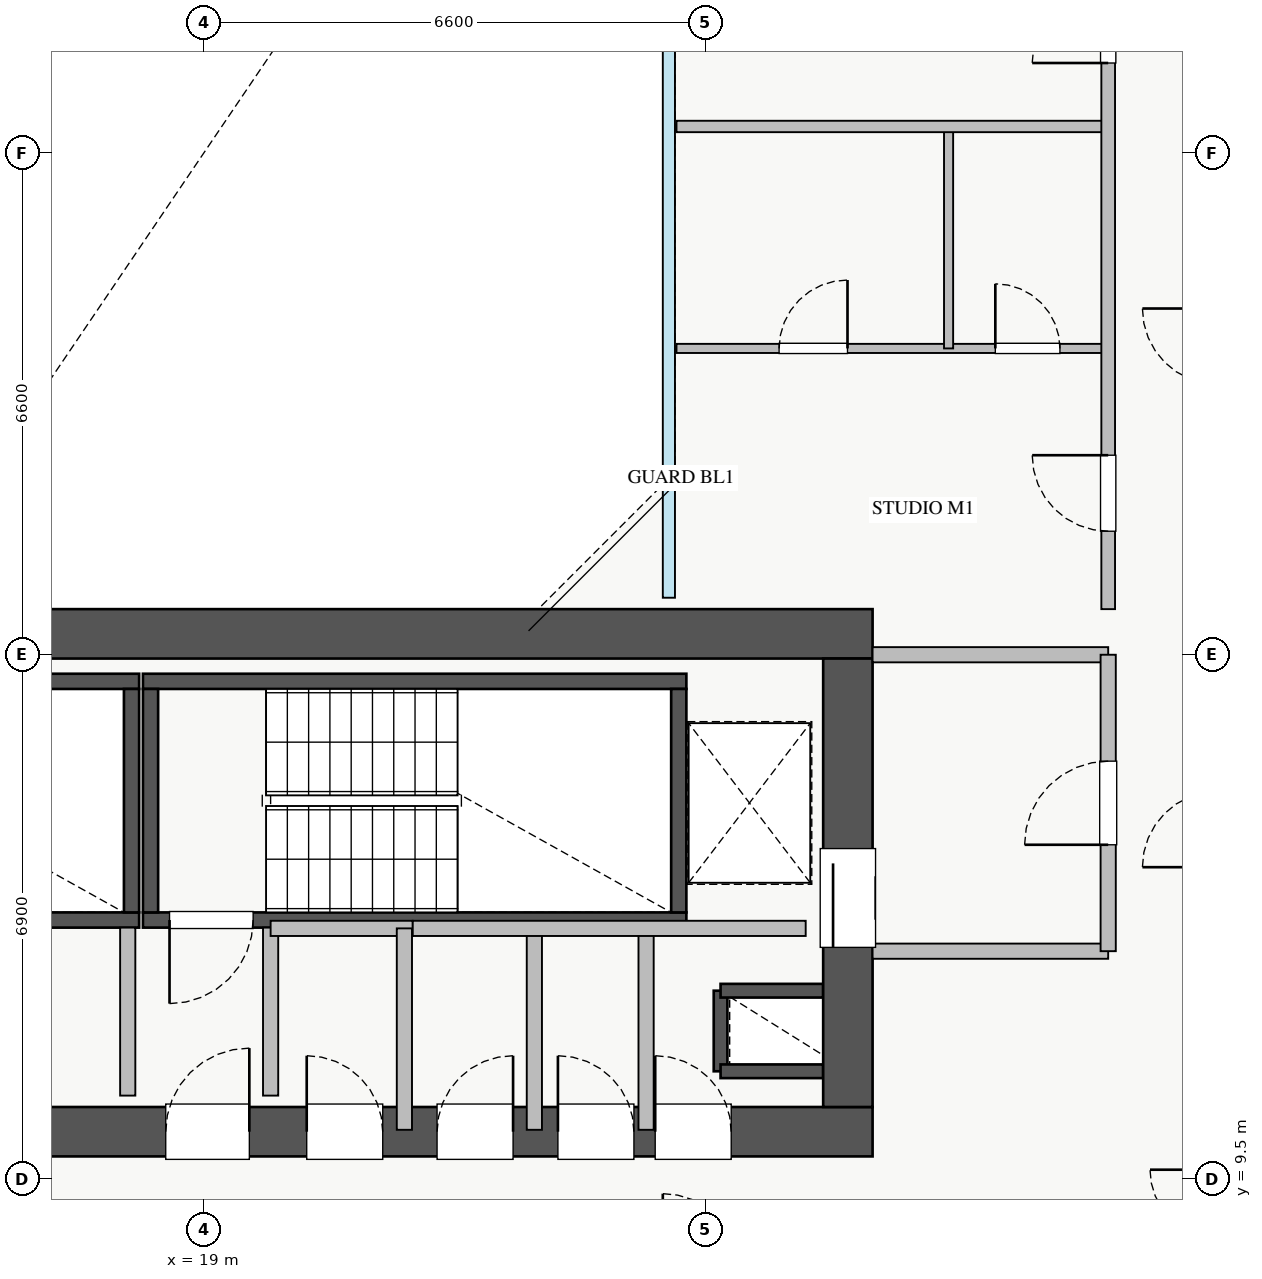
"""IFC4 building model, lengths in metres.
Left out: names, types, materials, properties, quantities, classifications, styles, units other than length and angle.
Written with IfcOpenShell. Run it as: python <this file> out.ifc"""

import sys

from ifc_helpers import new_model, si_unit, direction, frame, frame_2d, origin, place, context, subcontext, project, spatial, rectangle, extrude, source, transform, mapped, element, fill, save


model = new_model("IFC4")
c1 = context("Model", 3, precision=1e-05, world=origin(), true_north=direction((0.0, 1.0)))
c2 = subcontext(c1, "Body", "Model", "MODEL_VIEW")
j1 = project(units=[si_unit("LENGTHUNIT", "METRE"), si_unit("PLANEANGLEUNIT", "RADIAN")], contexts=[c1])
p1 = place(None, origin())
s1 = spatial("IfcSite", under=j1, at=p1, CompositionType="ELEMENT")
p2 = place(p1, origin())
s2 = spatial("IfcBuilding", under=s1, at=p2, CompositionType="ELEMENT")
p3 = place(p2, frame((0.0, 0.0, 123.0)))
s3 = spatial("IfcBuildingStorey", under=s2, at=p3, CompositionType="ELEMENT", Elevation=123.0)
p4 = place(p3, frame((25.8, 10.92, 0.0), z_axis=(0.0, 0.0, 1.0), x_axis=(0.0, 1.0, 0.0)))
e1 = element("IfcWall", 1, at=p4, inside=s3, PredefinedType="SHEAR", context=c2, shape_type="SweptSolid", body=[
    extrude(rectangle(XDim=1.06, YDim=0.18, at=frame_2d((0.53, 0.0))), origin(), (0.0, 0.0, 1.0), 3.07),
])
for number, where, z_axis, x_axis in (
    (2, (25.8, 11.98, 0.0), (0.0, 0.0, 1.0), (1.0, 0.0, 0.0)),
    (3, (25.8, 10.92, 0.0), (0.0, 0.0, 1.0), (1.0, 0.0, 0.0)),
):
    element("IfcWall", number, at=place(p3, frame(where, z_axis=z_axis, x_axis=x_axis)), inside=s3, PredefinedType="SHEAR", context=c2, shape_type="SweptSolid", body=[
        extrude(rectangle(XDim=1.35, YDim=0.18, at=frame_2d((0.675, 0.0))), origin(), (0.0, 0.0, 1.0), 3.07),
    ])
p5 = place(p3, frame((10.85, 12.91, 0.0), z_axis=(0.0, 0.0, 1.0), x_axis=(1.0, 0.0, 0.0)))
e4 = element("IfcWall", 4, at=p5, inside=s3, PredefinedType="SHEAR", context=c2, shape_type="SweptSolid", body=[
    extrude(rectangle(XDim=7.3, YDim=0.2, at=frame_2d((3.65, 0.0))), origin(), (0.0, 0.0, 1.0), 3.25),
])
p6 = place(p5, frame((0.35, 0.0, 0.0)))
e5 = element("IfcOpeningElement", 5, at=p6, cuts=e4, PredefinedType="OPENING", context=c2, shape_type="SweptSolid", body=[
    extrude(rectangle(XDim=1.1, YDim=2.05, at=frame_2d((0.55, 1.025))), frame((0.0, 0.11, 0.0), z_axis=(0.0, -1.0, 0.0), x_axis=(1.0, 0.0, 0.0)), (0.0, 0.0, 1.0), 0.22),
])
p7 = place(p3, frame((10.85, 16.05, 0.0), z_axis=(0.0, 0.0, 1.0), x_axis=(1.0, 0.0, 0.0)))
e6 = element("IfcWall", 6, at=p7, inside=s3, PredefinedType="SHEAR", context=c2, shape_type="SweptSolid", body=[
    extrude(rectangle(XDim=7.3, YDim=0.2, at=frame_2d((3.65, 0.0))), origin(), (0.0, 0.0, 1.0), 3.25),
])
p8 = place(p3, frame((18.05, 13.01, 0.0), z_axis=(0.0, 0.0, 1.0), x_axis=(0.0, 1.0, 0.0)))
e7 = element("IfcWall", 7, at=p8, inside=s3, PredefinedType="SHEAR", context=c2, shape_type="SweptSolid", body=[
    extrude(rectangle(XDim=2.94, YDim=0.2, at=frame_2d((1.47, 0.0))), origin(), (0.0, 0.0, 1.0), 3.25),
])
p9 = place(p3, frame((18.2, 12.91, 0.0), z_axis=(0.0, 0.0, 1.0), x_axis=(1.0, 0.0, 0.0)))
e8 = element("IfcWall", 8, at=p9, inside=s3, PredefinedType="SHEAR", context=c2, shape_type="SweptSolid", body=[
    extrude(rectangle(XDim=7.15, YDim=0.2, at=frame_2d((3.575, 0.0))), origin(), (0.0, 0.0, 1.0), 3.25),
])
p10 = place(p9, frame((0.35, 0.0, 0.0)))
e9 = element("IfcOpeningElement", 9, at=p10, cuts=e8, PredefinedType="OPENING", context=c2, shape_type="SweptSolid", body=[
    extrude(rectangle(XDim=1.1, YDim=2.05, at=frame_2d((0.55, 1.025))), frame((0.0, 0.11, 0.0), z_axis=(0.0, -1.0, 0.0), x_axis=(1.0, 0.0, 0.0)), (0.0, 0.0, 1.0), 0.22),
])
p11 = place(p3, frame((18.2, 16.05, 0.0), z_axis=(0.0, 0.0, 1.0), x_axis=(1.0, 0.0, 0.0)))
e10 = element("IfcWall", 10, at=p11, inside=s3, PredefinedType="SHEAR", context=c2, shape_type="SweptSolid", body=[
    extrude(rectangle(XDim=7.15, YDim=0.2, at=frame_2d((3.575, 0.0))), origin(), (0.0, 0.0, 1.0), 3.25),
])
for number, where, z_axis, x_axis in (
    (11, (18.3, 13.01, 0.0), (0.0, 0.0, 1.0), (0.0, 1.0, 0.0)),
    (12, (25.25, 13.01, 0.0), (0.0, 0.0, 1.0), (0.0, 1.0, 0.0)),
):
    element("IfcWall", number, at=place(p3, frame(where, z_axis=z_axis, x_axis=x_axis)), inside=s3, PredefinedType="SHEAR", context=c2, shape_type="SweptSolid", body=[
        extrude(rectangle(XDim=2.94, YDim=0.2, at=frame_2d((1.47, 0.0))), origin(), (0.0, 0.0, 1.0), 3.25),
    ])
p12 = place(p3, frame((10.2, 10.125, 0.0), z_axis=(0.0, 0.0, 1.0), x_axis=(1.0, 0.0, 0.0)))
e13 = element("IfcWall", 13, at=p12, inside=s3, PredefinedType="SHEAR", context=c2, shape_type="SweptSolid", body=[
    extrude(rectangle(XDim=17.6, YDim=0.65, at=frame_2d((8.8, 0.0))), origin(), (0.0, 0.0, 1.0), 3.25),
])
p13 = place(p12, frame((1.15, 0.0, 0.0)))
e14 = element("IfcOpeningElement", 14, at=p13, cuts=e13, PredefinedType="OPENING", context=c2, shape_type="SweptSolid", body=[
    extrude(rectangle(XDim=1.1, YDim=2.05, at=frame_2d((0.55, 1.025))), frame((0.0, 0.335, 0.0), z_axis=(0.0, -1.0, 0.0), x_axis=(1.0, 0.0, 0.0)), (0.0, 0.0, 1.0), 0.67),
])
p14 = place(p12, frame((8.3, 0.0, 0.0)))
e15 = element("IfcOpeningElement", 15, at=p14, cuts=e13, PredefinedType="OPENING", context=c2, shape_type="SweptSolid", body=[
    extrude(rectangle(XDim=1.1, YDim=2.05, at=frame_2d((0.55, 1.025))), frame((0.0, 0.335, 0.0), z_axis=(0.0, -1.0, 0.0), x_axis=(1.0, 0.0, 0.0)), (0.0, 0.0, 1.0), 0.67),
])
p15 = place(p12, frame((4.9, 0.0, 0.0)))
e16 = element("IfcOpeningElement", 16, at=p15, cuts=e13, PredefinedType="OPENING", context=c2, shape_type="SweptSolid", body=[
    extrude(rectangle(XDim=1.1, YDim=2.05, at=frame_2d((0.55, 1.025))), frame((0.0, 0.335, 0.0), z_axis=(0.0, -1.0, 0.0), x_axis=(1.0, 0.0, 0.0)), (0.0, 0.0, 1.0), 0.67),
])
p16 = place(p12, frame((14.74, 0.0, 0.0)))
e17 = element("IfcOpeningElement", 17, at=p16, cuts=e13, PredefinedType="OPENING", context=c2, shape_type="SweptSolid", body=[
    extrude(rectangle(XDim=1.0, YDim=2.05, at=frame_2d((0.5, 1.025))), frame((0.0, 0.335, 0.0), z_axis=(0.0, -1.0, 0.0), x_axis=(1.0, 0.0, 0.0)), (0.0, 0.0, 1.0), 0.67),
])
p17 = place(p12, frame((10.155, 0.0, 0.0)))
e18 = element("IfcOpeningElement", 18, at=p17, cuts=e13, PredefinedType="OPENING", context=c2, shape_type="SweptSolid", body=[
    extrude(rectangle(XDim=1.0, YDim=2.05, at=frame_2d((0.5, 1.025))), frame((0.0, 0.335, 0.0), z_axis=(0.0, -1.0, 0.0), x_axis=(1.0, 0.0, 0.0)), (0.0, 0.0, 1.0), 0.67),
])
p18 = place(p12, frame((11.87, 0.0, 0.0)))
e19 = element("IfcOpeningElement", 19, at=p18, cuts=e13, PredefinedType="OPENING", context=c2, shape_type="SweptSolid", body=[
    extrude(rectangle(XDim=1.0, YDim=2.05, at=frame_2d((0.5, 1.025))), frame((0.0, 0.335, 0.0), z_axis=(0.0, -1.0, 0.0), x_axis=(1.0, 0.0, 0.0)), (0.0, 0.0, 1.0), 0.67),
])
p19 = place(p12, frame((13.46, 0.0, 0.0)))
e20 = element("IfcOpeningElement", 20, at=p19, cuts=e13, PredefinedType="OPENING", context=c2, shape_type="SweptSolid", body=[
    extrude(rectangle(XDim=1.0, YDim=2.05, at=frame_2d((0.5, 1.025))), frame((0.0, 0.335, 0.0), z_axis=(0.0, -1.0, 0.0), x_axis=(1.0, 0.0, 0.0)), (0.0, 0.0, 1.0), 0.67),
])
p20 = place(p3, frame((10.2, 16.675, 0.0), z_axis=(0.0, 0.0, 1.0), x_axis=(1.0, 0.0, 0.0)))
e21 = element("IfcWall", 21, at=p20, inside=s3, PredefinedType="SHEAR", context=c2, shape_type="SweptSolid", body=[
    extrude(rectangle(XDim=17.6, YDim=0.65, at=frame_2d((8.8, 0.0))), origin(), (0.0, 0.0, 1.0), 3.25),
])
p21 = place(p3, frame((27.475, 10.45, 0.0), z_axis=(0.0, 0.0, 1.0), x_axis=(0.0, 1.0, 0.0)))
e22 = element("IfcWall", 22, at=p21, inside=s3, PredefinedType="SHEAR", context=c2, shape_type="SweptSolid", body=[
    extrude(rectangle(XDim=5.9, YDim=0.65, at=frame_2d((2.95, 0.0))), origin(), (0.0, 0.0, 1.0), 3.25),
])
p22 = place(p21, frame((2.1, 0.0, 0.0)))
e23 = element("IfcOpeningElement", 23, at=p22, cuts=e22, PredefinedType="OPENING", context=c2, shape_type="SweptSolid", body=[
    extrude(rectangle(XDim=1.3, YDim=2.05, at=frame_2d((0.65, 1.025))), frame((0.0, 0.335, 0.0), z_axis=(0.0, -1.0, 0.0), x_axis=(1.0, 0.0, 0.0)), (0.0, 0.0, 1.0), 0.67),
])
for number, where, z_axis, x_axis in (
    (24, (27.8, 16.4, 0.0), (0.0, 0.0, 1.0), (1.0, 0.0, 0.0)),
    (25, (27.8, 12.5, 0.0), (0.0, 0.0, 1.0), (1.0, 0.0, 0.0)),
):
    element("IfcWall", number, at=place(p3, frame(where, z_axis=z_axis, x_axis=x_axis)), inside=s3, PredefinedType="PARTITIONING", context=c2, shape_type="SweptSolid", body=[
        extrude(rectangle(XDim=3.1, YDim=0.2, at=frame_2d((1.55, 0.0))), origin(), (0.0, 0.0, 1.0), 3.07),
    ])
p23 = place(p3, frame((30.9, 12.5, 0.0), z_axis=(0.0, 0.0, 1.0), x_axis=(0.0, 1.0, 0.0)))
e26 = element("IfcWall", 26, at=p23, inside=s3, PredefinedType="PARTITIONING", context=c2, shape_type="SweptSolid", body=[
    extrude(rectangle(XDim=3.9, YDim=0.2, at=frame_2d((1.95, 0.0))), origin(), (0.0, 0.0, 1.0), 3.07),
])
p24 = place(p23, frame((1.4, 0.0, 0.0)))
e27 = element("IfcOpeningElement", 27, at=p24, cuts=e26, PredefinedType="OPENING", context=c2, shape_type="SweptSolid", body=[
    extrude(rectangle(XDim=1.1, YDim=2.05, at=frame_2d((0.55, 1.025))), frame((0.0, 0.11, 0.0), z_axis=(0.0, -1.0, 0.0), x_axis=(1.0, 0.0, 0.0)), (0.0, 0.0, 1.0), 0.22),
])
for number, where, z_axis, x_axis in (
    (28, (18.0, 10.6, 0.0), (0.0, 0.0, 1.0), (0.0, 1.0, 0.0)),
    (29, (19.88, 10.6, 0.0), (0.0, 0.0, 1.0), (0.0, 1.0, 0.0)),
):
    element("IfcWall", number, at=place(p3, frame(where, z_axis=z_axis, x_axis=x_axis)), inside=s3, PredefinedType="PARTITIONING", context=c2, shape_type="SweptSolid", body=[
        extrude(rectangle(XDim=2.21, YDim=0.2, at=frame_2d((1.105, 0.0))), origin(), (0.0, 0.0, 1.0), 3.07),
    ])
p25 = place(p3, frame((24.82, 10.15, 0.0), z_axis=(0.0, 0.0, 1.0), x_axis=(0.0, 1.0, 0.0)))
e30 = element("IfcWall", 30, at=p25, inside=s3, PredefinedType="PARTITIONING", context=c2, shape_type="SweptSolid", body=[
    extrude(rectangle(XDim=2.65, YDim=0.2, at=frame_2d((1.325, 0.0))), origin(), (0.0, 0.0, 1.0), 3.07),
])
p26 = place(p3, frame((19.88, 12.8, 0.0), z_axis=(0.0, 0.0, 1.0), x_axis=(1.0, 0.0, 0.0)))
e31 = element("IfcWall", 31, at=p26, inside=s3, PredefinedType="PARTITIONING", context=c2, shape_type="SweptSolid", body=[
    extrude(rectangle(XDim=1.87, YDim=0.2, at=frame_2d((0.935, 0.0))), origin(), (0.0, 0.0, 1.0), 3.07),
])
for number, where, z_axis, x_axis in (
    (32, (21.64, 10.15, 0.0), (0.0, 0.0, 1.0), (0.0, 1.0, 0.0)),
    (33, (23.35, 10.15, 0.0), (0.0, 0.0, 1.0), (0.0, 1.0, 0.0)),
):
    element("IfcWall", number, at=place(p3, frame(where, z_axis=z_axis, x_axis=x_axis)), inside=s3, PredefinedType="PARTITIONING", context=c2, shape_type="SweptSolid", body=[
        extrude(rectangle(XDim=2.65, YDim=0.2, at=frame_2d((1.325, 0.0))), origin(), (0.0, 0.0, 1.0), 3.07),
    ])
p27 = place(p3, frame((21.75, 12.8, 0.0), z_axis=(0.0, 0.0, 1.0), x_axis=(1.0, 0.0, 0.0)))
e34 = element("IfcWall", 34, at=p27, inside=s3, PredefinedType="PARTITIONING", context=c2, shape_type="SweptSolid", body=[
    extrude(rectangle(XDim=5.17, YDim=0.2, at=frame_2d((2.585, 0.0))), origin(), (0.0, 0.0, 1.0), 3.07),
])
p28 = place(p3, frame((25.22, 20.43, 0.0), z_axis=(0.0, 0.0, 1.0), x_axis=(1.0, 0.0, 0.0)))
e35 = element("IfcWall", 35, at=p28, inside=s3, PredefinedType="PLUMBINGWALL", context=c2, shape_type="SweptSolid", body=[
    extrude(rectangle(XDim=5.68, YDim=0.12, at=frame_2d((2.84, 0.0))), origin(), (0.0, 0.0, 1.0), 3.07),
])
p29 = place(p28, frame((1.35, 0.0, 0.0)))
e36 = element("IfcOpeningElement", 36, at=p29, cuts=e35, PredefinedType="OPENING", context=c2, shape_type="SweptSolid", body=[
    extrude(rectangle(XDim=0.9, YDim=2.05, at=frame_2d((0.45, 1.025))), frame((0.0, 0.07, 0.0), z_axis=(0.0, -1.0, 0.0), x_axis=(1.0, 0.0, 0.0)), (0.0, 0.0, 1.0), 0.14),
])
p30 = place(p28, frame((4.195, 0.0, 0.0)))
e37 = element("IfcOpeningElement", 37, at=p30, cuts=e35, PredefinedType="OPENING", context=c2, shape_type="SweptSolid", body=[
    extrude(rectangle(XDim=0.85, YDim=2.05, at=frame_2d((0.425, 1.025))), frame((0.0, 0.07, 0.0), z_axis=(0.0, -1.0, 0.0), x_axis=(1.0, 0.0, 0.0)), (0.0, 0.0, 1.0), 0.14),
])
p31 = place(p3, frame((28.8, 20.43, 0.0), z_axis=(0.0, 0.0, 1.0), x_axis=(0.0, 1.0, 0.0)))
e38 = element("IfcWall", 38, at=p31, inside=s3, PredefinedType="PLUMBINGWALL", context=c2, shape_type="SweptSolid", body=[
    extrude(rectangle(XDim=2.92, YDim=0.12, at=frame_2d((1.46, 0.0))), origin(), (0.0, 0.0, 1.0), 3.07),
])
p32 = place(p3, frame((25.22, 23.35, 0.0), z_axis=(0.0, 0.0, 1.0), x_axis=(1.0, 0.0, 0.0)))
e39 = element("IfcWall", 39, at=p32, inside=s3, PredefinedType="PARTITIONING", context=c2, shape_type="SweptSolid", body=[
    extrude(rectangle(XDim=5.68, YDim=0.15, at=frame_2d((2.84, 0.0))), origin(), (0.0, 0.0, 1.0), 3.07),
])
p33 = place(p3, frame((30.9, 17.0, 0.0), z_axis=(0.0, 0.0, 1.0), x_axis=(0.0, 1.0, 0.0)))
e40 = element("IfcWall", 40, at=p33, inside=s3, PredefinedType="PARTITIONING", context=c2, shape_type="SweptSolid", body=[
    extrude(rectangle(XDim=12.0, YDim=0.18, at=frame_2d((6.0, 0.0))), origin(), (0.0, 0.0, 1.0), 3.07),
])
p34 = place(p33, frame((1.025, 0.0, 0.0)))
e41 = element("IfcOpeningElement", 41, at=p34, cuts=e40, PredefinedType="OPENING", context=c2, shape_type="SweptSolid", body=[
    extrude(rectangle(XDim=1.0, YDim=2.05, at=frame_2d((0.5, 1.025))), frame((0.0, 0.1, 0.0), z_axis=(0.0, -1.0, 0.0), x_axis=(1.0, 0.0, 0.0)), (0.0, 0.0, 1.0), 0.2),
])
p35 = place(p33, frame((7.185, 0.0, 0.0)))
e42 = element("IfcOpeningElement", 42, at=p35, cuts=e40, PredefinedType="OPENING", context=c2, shape_type="SweptSolid", body=[
    extrude(rectangle(XDim=1.0, YDim=2.05, at=frame_2d((0.5, 1.025))), frame((0.0, 0.1, 0.0), z_axis=(0.0, -1.0, 0.0), x_axis=(1.0, 0.0, 0.0)), (0.0, 0.0, 1.0), 0.2),
])
m1 = source(origin(), c2, "Body", "SweptSolid", [
    extrude(rectangle(XDim=1.3, YDim=2.05, at=frame_2d((0.65, 1.025))), frame((0.0, 0.025, 0.0), z_axis=(0.0, -1.0, 0.0), x_axis=(1.0, 0.0, 0.0)), (0.0, 0.0, 1.0), 0.05),
])
p36 = place(p22, origin())
e43 = element("IfcDoor", 43, at=p36, inside=s3, OperationType="SLIDING_TO_RIGHT", PredefinedType="DOOR", context=c2, shape_type="MappedRepresentation", body=[
    mapped(m1, transform((0.0, 0.0, 0.0), x_axis=(1.0, 0.0, 0.0), y_axis=(0.0, 1.0, 0.0), z_axis=(0.0, 0.0, 1.0), scale=1.0)),
])
fill(e23, e43)
m2 = source(origin(), c2, "Body", "SweptSolid", [
    extrude(rectangle(XDim=1.1, YDim=2.05, at=frame_2d((0.55, 1.025))), frame((0.0, 0.025, 0.0), z_axis=(0.0, -1.0, 0.0), x_axis=(1.0, 0.0, 0.0)), (0.0, 0.0, 1.0), 0.05),
])
p37 = place(p14, origin())
e44 = element("IfcDoor", 44, at=p37, inside=s3, OperationType="SINGLE_SWING_RIGHT", PredefinedType="DOOR", context=c2, shape_type="MappedRepresentation", body=[
    mapped(m2, transform((0.0, 0.0, 0.0), x_axis=(1.0, 0.0, 0.0), y_axis=(0.0, 1.0, 0.0), z_axis=(0.0, 0.0, 1.0), scale=1.0)),
])
fill(e15, e44)
p38 = place(p10, frame((1.1, 0.0, 0.0), z_axis=(0.0, 0.0, 1.0), x_axis=(-1.0, 0.0, 0.0)))
e45 = element("IfcDoor", 45, at=p38, inside=s3, OperationType="SINGLE_SWING_LEFT", PredefinedType="DOOR", context=c2, shape_type="MappedRepresentation", body=[
    mapped(m2, transform((0.0, 0.0, 0.0), x_axis=(1.0, 0.0, 0.0), y_axis=(0.0, 1.0, 0.0), z_axis=(0.0, 0.0, 1.0), scale=1.0)),
])
fill(e9, e45)
m3 = source(origin(), c2, "Body", "SweptSolid", [
    extrude(rectangle(XDim=1.0, YDim=2.05, at=frame_2d((0.5, 1.025))), frame((0.0, 0.025, 0.0), z_axis=(0.0, -1.0, 0.0), x_axis=(1.0, 0.0, 0.0)), (0.0, 0.0, 1.0), 0.05),
])
p39 = place(p16, origin())
e46 = element("IfcDoor", 46, at=p39, inside=s3, OperationType="SINGLE_SWING_LEFT", PredefinedType="DOOR", context=c2, shape_type="MappedRepresentation", body=[
    mapped(m3, transform((0.0, 0.0, 0.0), x_axis=(1.0, 0.0, 0.0), y_axis=(0.0, 1.0, 0.0), z_axis=(0.0, 0.0, 1.0), scale=1.0)),
])
fill(e17, e46)
p40 = place(p17, origin())
e47 = element("IfcDoor", 47, at=p40, inside=s3, OperationType="SINGLE_SWING_LEFT", PredefinedType="DOOR", context=c2, shape_type="MappedRepresentation", body=[
    mapped(m3, transform((0.0, 0.0, 0.0), x_axis=(1.0, 0.0, 0.0), y_axis=(0.0, 1.0, 0.0), z_axis=(0.0, 0.0, 1.0), scale=1.0)),
])
fill(e18, e47)
p41 = place(p18, origin())
e48 = element("IfcDoor", 48, at=p41, inside=s3, OperationType="SINGLE_SWING_RIGHT", PredefinedType="DOOR", context=c2, shape_type="MappedRepresentation", body=[
    mapped(m3, transform((0.0, 0.0, 0.0), x_axis=(1.0, 0.0, 0.0), y_axis=(0.0, 1.0, 0.0), z_axis=(0.0, 0.0, 1.0), scale=1.0)),
])
fill(e19, e48)
p42 = place(p19, origin())
e49 = element("IfcDoor", 49, at=p42, inside=s3, OperationType="SINGLE_SWING_LEFT", PredefinedType="DOOR", context=c2, shape_type="MappedRepresentation", body=[
    mapped(m3, transform((0.0, 0.0, 0.0), x_axis=(1.0, 0.0, 0.0), y_axis=(0.0, 1.0, 0.0), z_axis=(0.0, 0.0, 1.0), scale=1.0)),
])
fill(e20, e49)
p43 = place(p24, origin())
e50 = element("IfcDoor", 50, at=p43, inside=s3, OperationType="SINGLE_SWING_LEFT", PredefinedType="DOOR", context=c2, shape_type="MappedRepresentation", body=[
    mapped(m2, transform((0.0, 0.0, 0.0), x_axis=(1.0, 0.0, 0.0), y_axis=(0.0, 1.0, 0.0), z_axis=(0.0, 0.0, 1.0), scale=1.0)),
])
fill(e27, e50)
m4 = source(origin(), c2, "Body", "SweptSolid", [
    extrude(rectangle(XDim=0.9, YDim=2.05, at=frame_2d((0.45, 1.025))), frame((0.0, 0.025, 0.0), z_axis=(0.0, -1.0, 0.0), x_axis=(1.0, 0.0, 0.0)), (0.0, 0.0, 1.0), 0.05),
])
p44 = place(p29, origin())
e51 = element("IfcDoor", 51, at=p44, inside=s3, OperationType="SINGLE_SWING_RIGHT", PredefinedType="DOOR", context=c2, shape_type="MappedRepresentation", body=[
    mapped(m4, transform((0.0, 0.0, 0.0), x_axis=(1.0, 0.0, 0.0), y_axis=(0.0, 1.0, 0.0), z_axis=(0.0, 0.0, 1.0), scale=1.0)),
])
fill(e36, e51)
m5 = source(origin(), c2, "Body", "SweptSolid", [
    extrude(rectangle(XDim=0.85, YDim=2.05, at=frame_2d((0.425, 1.025))), frame((0.0, 0.025, 0.0), z_axis=(0.0, -1.0, 0.0), x_axis=(1.0, 0.0, 0.0)), (0.0, 0.0, 1.0), 0.05),
])
p45 = place(p30, origin())
e52 = element("IfcDoor", 52, at=p45, inside=s3, OperationType="SINGLE_SWING_LEFT", PredefinedType="DOOR", context=c2, shape_type="MappedRepresentation", body=[
    mapped(m5, transform((0.0, 0.0, 0.0), x_axis=(1.0, 0.0, 0.0), y_axis=(0.0, 1.0, 0.0), z_axis=(0.0, 0.0, 1.0), scale=1.0)),
])
fill(e37, e52)
p46 = place(p34, origin())
e53 = element("IfcDoor", 53, at=p46, inside=s3, OperationType="SINGLE_SWING_RIGHT", PredefinedType="DOOR", context=c2, shape_type="MappedRepresentation", body=[
    mapped(m3, transform((0.0, 0.0, 0.0), x_axis=(1.0, 0.0, 0.0), y_axis=(0.0, 1.0, 0.0), z_axis=(0.0, 0.0, 1.0), scale=1.0)),
])
fill(e41, e53)
p47 = place(p35, origin())
e54 = element("IfcDoor", 54, at=p47, inside=s3, OperationType="SINGLE_SWING_LEFT", PredefinedType="DOOR", context=c2, shape_type="MappedRepresentation", body=[
    mapped(m3, transform((0.0, 0.0, 0.0), x_axis=(1.0, 0.0, 0.0), y_axis=(0.0, 1.0, 0.0), z_axis=(0.0, 0.0, 1.0), scale=1.0)),
])
fill(e42, e54)
save(model, sys.argv[1])
